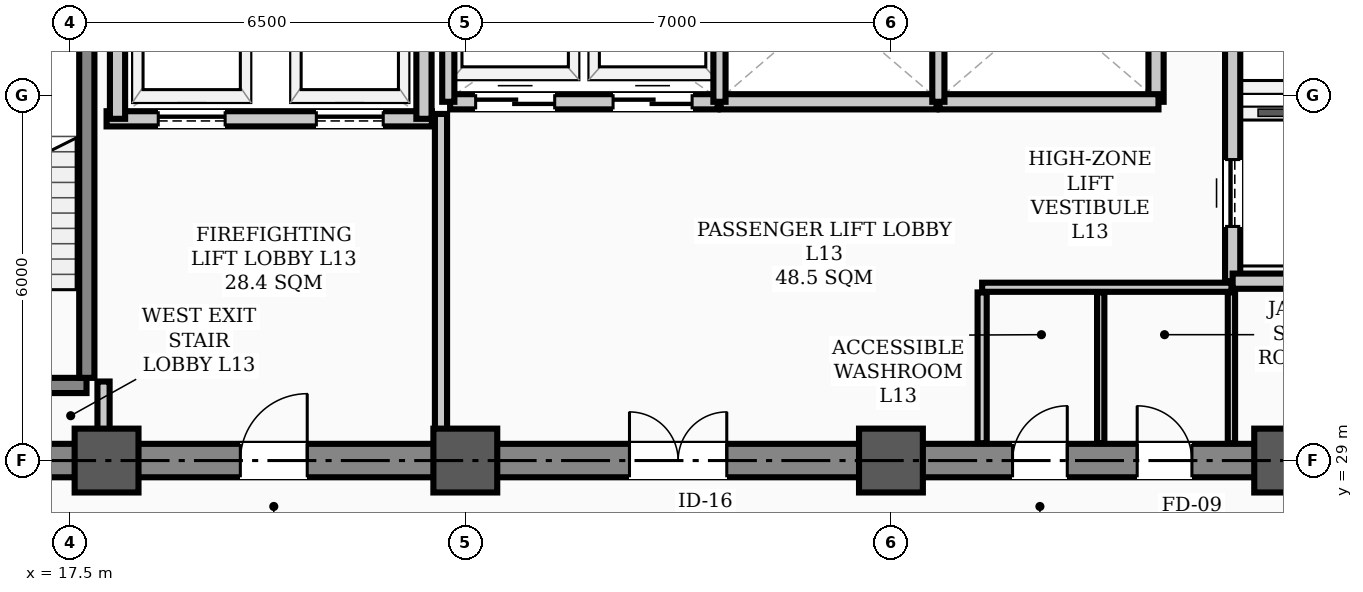
"""IFC4 building model, lengths in metres.
Left out: names, types, materials, properties, quantities, classifications, styles, units other than length and angle.
Written with IfcOpenShell. Run it as: python <this file> out.ifc"""

import sys

from ifc_helpers import new_model, si_unit, direction, frame, frame_2d, origin, origin_2d, place, context, subcontext, project, spatial, rectangle, hollow_rectangle, extrude, element, fill, save


model = new_model("IFC4")
c1 = context("Model", 3, precision=1e-05, world=origin(), true_north=direction((0.0, 1.0)))
c2 = subcontext(c1, "Body", "Model", "MODEL_VIEW")
j1 = project(units=[si_unit("LENGTHUNIT", "METRE"), si_unit("PLANEANGLEUNIT", "RADIAN")], contexts=[c1])
p1 = place(None, origin())
s1 = spatial("IfcSite", under=j1, at=p1, CompositionType="ELEMENT")
p2 = place(p1, origin())
s2 = spatial("IfcBuilding", under=s1, at=p2, CompositionType="ELEMENT")
p3 = place(p2, frame((0.0, 0.0, 53.8)))
s3 = spatial("IfcBuildingStorey", under=s2, at=p3, CompositionType="ELEMENT", Elevation=53.8)
for number, where, z_axis, x_axis in (
    (1, (18.1, 29.0, 0.0), (0.0, 0.0, 1.0), (1.0, 0.0, 0.0)),
    (2, (24.0, 29.0, 0.0), (0.0, 0.0, 1.0), (1.0, 0.0, 0.0)),
    (3, (31.0, 29.0, 0.0), (0.0, 0.0, 1.0), (1.0, 0.0, 0.0)),
    (4, (37.5, 29.0, 0.0), (0.0, 0.0, 1.0), (1.0, 0.0, 0.0)),
):
    element("IfcColumn", number, at=place(p3, frame(where, z_axis=z_axis, x_axis=x_axis)), inside=s3, PredefinedType="COLUMN", context=c2, shape_type="SweptSolid", body=[
        extrude(hollow_rectangle(XDim=1.05, YDim=1.05, WallThickness=0.038, InnerFilletRadius=0.019, OuterFilletRadius=0.057, at=origin_2d()), origin(), (0.0, 0.0, 1.0), 3.9),
    ])
p4 = place(p3, frame((13.5, 29.0, 0.0), z_axis=(0.0, 0.0, 1.0), x_axis=(1.0, 0.0, 0.0)))
e5 = element("IfcWall", 5, at=p4, inside=s3, PredefinedType="SHEAR", context=c2, shape_type="SweptSolid", body=[
    extrude(rectangle(XDim=30.5, YDim=0.55, at=frame_2d((15.25, 0.0))), origin(), (0.0, 0.0, 1.0), 3.72),
])
p5 = place(p4, frame((1.75, 0.0, 0.0)))
e6 = element("IfcOpeningElement", 6, at=p5, cuts=e5, PredefinedType="OPENING", context=c2, shape_type="SweptSolid", body=[
    extrude(rectangle(XDim=1.1, YDim=2.08, at=frame_2d((0.55, 1.04))), frame((0.0, 0.285, 0.0), z_axis=(0.0, -1.0, 0.0), x_axis=(1.0, 0.0, 0.0)), (0.0, 0.0, 1.0), 0.57),
])
p6 = place(p4, frame((26.7, 0.0, 0.0)))
e7 = element("IfcOpeningElement", 7, at=p6, cuts=e5, PredefinedType="OPENING", context=c2, shape_type="SweptSolid", body=[
    extrude(rectangle(XDim=1.1, YDim=2.08, at=frame_2d((0.55, 1.04))), frame((0.0, 0.285, 0.0), z_axis=(0.0, -1.0, 0.0), x_axis=(1.0, 0.0, 0.0)), (0.0, 0.0, 1.0), 0.57),
])
p7 = place(p4, frame((6.8, 0.0, 0.0)))
e8 = element("IfcOpeningElement", 8, at=p7, cuts=e5, PredefinedType="OPENING", context=c2, shape_type="SweptSolid", body=[
    extrude(rectangle(XDim=1.1, YDim=2.08, at=frame_2d((0.55, 1.04))), frame((0.0, 0.285, 0.0), z_axis=(0.0, -1.0, 0.0), x_axis=(1.0, 0.0, 0.0)), (0.0, 0.0, 1.0), 0.57),
])
p8 = place(p4, frame((13.2, 0.0, 0.0)))
e9 = element("IfcOpeningElement", 9, at=p8, cuts=e5, PredefinedType="OPENING", context=c2, shape_type="SweptSolid", body=[
    extrude(rectangle(XDim=1.6, YDim=2.08, at=frame_2d((0.8, 1.04))), frame((0.0, 0.285, 0.0), z_axis=(0.0, -1.0, 0.0), x_axis=(1.0, 0.0, 0.0)), (0.0, 0.0, 1.0), 0.57),
])
p9 = place(p4, frame((19.5, 0.0, 0.0)))
e10 = element("IfcOpeningElement", 10, at=p9, cuts=e5, PredefinedType="OPENING", context=c2, shape_type="SweptSolid", body=[
    extrude(rectangle(XDim=0.9, YDim=2.08, at=frame_2d((0.45, 1.04))), frame((0.0, 0.285, 0.0), z_axis=(0.0, -1.0, 0.0), x_axis=(1.0, 0.0, 0.0)), (0.0, 0.0, 1.0), 0.57),
])
p10 = place(p4, frame((21.55, 0.0, 0.0)))
e11 = element("IfcOpeningElement", 11, at=p10, cuts=e5, PredefinedType="OPENING", context=c2, shape_type="SweptSolid", body=[
    extrude(rectangle(XDim=0.9, YDim=2.08, at=frame_2d((0.45, 1.04))), frame((0.0, 0.285, 0.0), z_axis=(0.0, -1.0, 0.0), x_axis=(1.0, 0.0, 0.0)), (0.0, 0.0, 1.0), 0.57),
])
p11 = place(p3, frame((14.43, 30.235, 0.0), z_axis=(0.0, 0.0, 1.0), x_axis=(1.0, 0.0, 0.0)))
e12 = element("IfcWall", 12, at=p11, inside=s3, PredefinedType="STANDARD", context=c2, shape_type="SweptSolid", body=[
    extrude(rectangle(XDim=3.34, YDim=0.25, at=frame_2d((1.67, 0.0))), origin(), (0.0, 0.0, 1.0), 3.72),
])
p12 = place(p11, frame((1.1, 0.0, 0.0)))
e13 = element("IfcOpeningElement", 13, at=p12, cuts=e12, PredefinedType="OPENING", context=c2, shape_type="SweptSolid", body=[
    extrude(rectangle(XDim=1.1, YDim=2.08, at=frame_2d((0.55, 1.04))), frame((0.0, 0.135, 0.0), z_axis=(0.0, -1.0, 0.0), x_axis=(1.0, 0.0, 0.0)), (0.0, 0.0, 1.0), 0.27),
])
p13 = place(p3, frame((17.775, 30.36, 0.0), z_axis=(0.0, 0.0, 1.0), x_axis=(0.0, 1.0, 0.0)))
e14 = element("IfcWall", 14, at=p13, inside=s3, PredefinedType="STANDARD", context=c2, shape_type="SweptSolid", body=[
    extrude(rectangle(XDim=7.184, YDim=0.25, at=frame_2d((3.592, 0.0))), origin(), (0.0, 0.0, 1.0), 3.72),
])
p14 = place(p3, frame((18.1, 34.62, 0.0), z_axis=(0.0, 0.0, 1.0), x_axis=(1.0, 0.0, 0.0)))
e15 = element("IfcWall", 15, at=p14, inside=s3, PredefinedType="STANDARD", context=c2, shape_type="SweptSolid", body=[
    extrude(rectangle(XDim=5.35, YDim=0.25, at=frame_2d((2.675, 0.0))), origin(), (0.0, 0.0, 1.0), 3.72),
])
p15 = place(p14, frame((0.85, 0.0, 0.0)))
e16 = element("IfcOpeningElement", 16, at=p15, cuts=e15, PredefinedType="OPENING", context=c2, shape_type="SweptSolid", body=[
    extrude(rectangle(XDim=1.1, YDim=2.08, at=frame_2d((0.55, 1.04))), frame((0.0, 0.135, 0.0), z_axis=(0.0, -1.0, 0.0), x_axis=(1.0, 0.0, 0.0)), (0.0, 0.0, 1.0), 0.27),
])
p16 = place(p14, frame((3.45, 0.0, 0.0)))
e17 = element("IfcOpeningElement", 17, at=p16, cuts=e15, PredefinedType="OPENING", context=c2, shape_type="SweptSolid", body=[
    extrude(rectangle(XDim=1.1, YDim=2.08, at=frame_2d((0.55, 1.04))), frame((0.0, 0.135, 0.0), z_axis=(0.0, -1.0, 0.0), x_axis=(1.0, 0.0, 0.0)), (0.0, 0.0, 1.0), 0.27),
])
p17 = place(p3, frame((36.62, 31.95, 0.0), z_axis=(0.0, 0.0, 1.0), x_axis=(0.0, 1.0, 0.0)))
e18 = element("IfcWall", 18, at=p17, inside=s3, PredefinedType="STANDARD", context=c2, shape_type="SweptSolid", body=[
    extrude(rectangle(XDim=6.0, YDim=0.25, at=frame_2d((3.0, 0.0))), origin(), (0.0, 0.0, 1.0), 3.3),
])
p18 = place(p17, frame((0.9, 0.0, 0.0)))
e19 = element("IfcOpeningElement", 19, at=p18, cuts=e18, PredefinedType="OPENING", context=c2, shape_type="SweptSolid", body=[
    extrude(rectangle(XDim=1.1, YDim=2.08, at=frame_2d((0.55, 1.04))), frame((0.0, 0.135, 0.0), z_axis=(0.0, -1.0, 0.0), x_axis=(1.0, 0.0, 0.0)), (0.0, 0.0, 1.0), 0.27),
])
p19 = place(p17, frame((4.0, 0.0, 0.0)))
e20 = element("IfcOpeningElement", 20, at=p19, cuts=e18, PredefinedType="OPENING", context=c2, shape_type="SweptSolid", body=[
    extrude(rectangle(XDim=1.1, YDim=2.08, at=frame_2d((0.55, 1.04))), frame((0.0, 0.135, 0.0), z_axis=(0.0, -1.0, 0.0), x_axis=(1.0, 0.0, 0.0)), (0.0, 0.0, 1.0), 0.27),
])
p20 = place(p3, frame((36.62, 31.95, 0.0), z_axis=(0.0, 0.0, 1.0), x_axis=(1.0, 0.0, 0.0)))
e21 = element("IfcWall", 21, at=p20, inside=s3, PredefinedType="STANDARD", context=c2, shape_type="SweptSolid", body=[
    extrude(rectangle(XDim=1.9, YDim=0.25, at=frame_2d((0.95, 0.0))), origin(), (0.0, 0.0, 1.0), 3.48),
])
for number, where, z_axis, x_axis in (
    (22, (18.28, 34.62, 0.0), (0.0, 0.0, 1.0), (0.0, 1.0, 0.0)),
    (23, (23.32, 34.62, 0.0), (0.0, 0.0, 1.0), (0.0, 1.0, 0.0)),
):
    element("IfcWall", number, at=place(p3, frame(where, z_axis=z_axis, x_axis=x_axis)), inside=s3, PredefinedType="STANDARD", context=c2, shape_type="SweptSolid", body=[
        extrude(rectangle(XDim=3.33, YDim=0.25, at=frame_2d((1.665, 0.0))), origin(), (0.0, 0.0, 1.0), 3.3),
    ])
p21 = place(p3, frame((35.36, 34.9, 0.0), z_axis=(0.0, 0.0, 1.0), x_axis=(0.0, 1.0, 0.0)))
e24 = element("IfcWall", 24, at=p21, inside=s3, PredefinedType="STANDARD", context=c2, shape_type="SweptSolid", body=[
    extrude(rectangle(XDim=3.05, YDim=0.25, at=frame_2d((1.525, 0.0))), origin(), (0.0, 0.0, 1.0), 3.3),
])
p22 = place(p3, frame((23.75, 34.9, 0.0), z_axis=(0.0, 0.0, 1.0), x_axis=(1.0, 0.0, 0.0)))
e25 = element("IfcWall", 25, at=p22, inside=s3, PredefinedType="STANDARD", context=c2, shape_type="SweptSolid", body=[
    extrude(rectangle(XDim=4.4, YDim=0.25, at=frame_2d((2.2, 0.0))), origin(), (0.0, 0.0, 1.0), 3.72),
])
p23 = place(p22, frame((0.42, 0.0, 0.0)))
e26 = element("IfcOpeningElement", 26, at=p23, cuts=e25, PredefinedType="OPENING", context=c2, shape_type="SweptSolid", body=[
    extrude(rectangle(XDim=1.3, YDim=2.08, at=frame_2d((0.65, 1.04))), frame((0.0, 0.135, 0.0), z_axis=(0.0, -1.0, 0.0), x_axis=(1.0, 0.0, 0.0)), (0.0, 0.0, 1.0), 0.27),
])
p24 = place(p22, frame((2.68, 0.0, 0.0)))
e27 = element("IfcOpeningElement", 27, at=p24, cuts=e25, PredefinedType="OPENING", context=c2, shape_type="SweptSolid", body=[
    extrude(rectangle(XDim=1.3, YDim=2.08, at=frame_2d((0.65, 1.04))), frame((0.0, 0.135, 0.0), z_axis=(0.0, -1.0, 0.0), x_axis=(1.0, 0.0, 0.0)), (0.0, 0.0, 1.0), 0.27),
])
p25 = place(p3, frame((28.2, 34.9, 0.0), z_axis=(0.0, 0.0, 1.0), x_axis=(1.0, 0.0, 0.0)))
e28 = element("IfcWall", 28, at=p25, inside=s3, PredefinedType="STANDARD", context=c2, shape_type="SweptSolid", body=[
    extrude(rectangle(XDim=3.55, YDim=0.25, at=frame_2d((1.775, 0.0))), origin(), (0.0, 0.0, 1.0), 3.72),
])
p26 = place(p3, frame((31.8, 34.9, 0.0), z_axis=(0.0, 0.0, 1.0), x_axis=(1.0, 0.0, 0.0)))
e29 = element("IfcWall", 29, at=p26, inside=s3, PredefinedType="STANDARD", context=c2, shape_type="SweptSolid", body=[
    extrude(rectangle(XDim=3.6, YDim=0.25, at=frame_2d((1.8, 0.0))), origin(), (0.0, 0.0, 1.0), 3.72),
])
p27 = place(p3, frame((32.5, 31.85, 0.0), z_axis=(0.0, 0.0, 1.0), x_axis=(1.0, 0.0, 0.0)))
e30 = element("IfcWall", 30, at=p27, inside=s3, PredefinedType="PARTITIONING", context=c2, shape_type="SweptSolid", body=[
    extrude(rectangle(XDim=4.1, YDim=0.15, at=frame_2d((2.05, 0.0))), origin(), (0.0, 0.0, 1.0), 3.72),
])
p28 = place(p3, frame((18.05, 29.285, 0.0), z_axis=(0.0, 0.0, 1.0), x_axis=(0.0, 1.0, 0.0)))
e31 = element("IfcWall", 31, at=p28, inside=s3, PredefinedType="STANDARD", context=c2, shape_type="SweptSolid", body=[
    extrude(rectangle(XDim=1.015, YDim=0.2, at=frame_2d((0.508, 0.0))), origin(), (0.0, 0.0, 1.0), 3.3),
])
p29 = place(p3, frame((23.6, 29.285, 0.0), z_axis=(0.0, 0.0, 1.0), x_axis=(0.0, 1.0, 0.0)))
e32 = element("IfcWall", 32, at=p29, inside=s3, PredefinedType="STANDARD", context=c2, shape_type="SweptSolid", body=[
    extrude(rectangle(XDim=5.415, YDim=0.2, at=frame_2d((2.708, 0.0))), origin(), (0.0, 0.0, 1.0), 3.1),
])
p30 = place(p3, frame((32.5, 29.285, 0.0), z_axis=(0.0, 0.0, 1.0), x_axis=(0.0, 1.0, 0.0)))
e33 = element("IfcWall", 33, at=p30, inside=s3, PredefinedType="PARTITIONING", context=c2, shape_type="SweptSolid", body=[
    extrude(rectangle(XDim=2.48, YDim=0.15, at=frame_2d((1.24, 0.0))), origin(), (0.0, 0.0, 1.0), 3.3),
])
for number, where, z_axis, x_axis in (
    (34, (36.6, 29.285, 0.0), (0.0, 0.0, 1.0), (0.0, 1.0, 0.0)),
    (35, (34.45, 29.285, 0.0), (0.0, 0.0, 1.0), (0.0, 1.0, 0.0)),
):
    element("IfcWall", number, at=place(p3, frame(where, z_axis=z_axis, x_axis=x_axis)), inside=s3, PredefinedType="PARTITIONING", context=c2, shape_type="SweptSolid", body=[
        extrude(rectangle(XDim=2.48, YDim=0.12, at=frame_2d((1.24, 0.0))), origin(), (0.0, 0.0, 1.0), 3.3),
    ])
p31 = place(p3, frame((23.72, 34.9, 0.0), z_axis=(0.0, 0.0, 1.0), x_axis=(0.0, 1.0, 0.0)))
e36 = element("IfcWall", 36, at=p31, inside=s3, PredefinedType="STANDARD", context=c2, shape_type="SweptSolid", body=[
    extrude(rectangle(XDim=3.12, YDim=0.2, at=frame_2d((1.56, 0.0))), origin(), (0.0, 0.0, 1.0), 3.1),
])
for number, where, z_axis, x_axis in (
    (37, (28.18, 34.9, 0.0), (0.0, 0.0, 1.0), (0.0, 1.0, 0.0)),
    (38, (31.78, 34.9, 0.0), (0.0, 0.0, 1.0), (0.0, 1.0, 0.0)),
):
    element("IfcWall", number, at=place(p3, frame(where, z_axis=z_axis, x_axis=x_axis)), inside=s3, PredefinedType="STANDARD", context=c2, shape_type="SweptSolid", body=[
        extrude(rectangle(XDim=3.12, YDim=0.2, at=frame_2d((1.56, 0.0))), origin(), (0.0, 0.0, 1.0), 3.3),
    ])
p32 = place(p7, origin())
e39 = element("IfcDoor", 39, at=p32, inside=s3, OperationType="SINGLE_SWING_RIGHT", PredefinedType="DOOR", context=c2, shape_type="SweptSolid", body=[
    extrude(rectangle(XDim=1.1, YDim=2.08, at=frame_2d((0.55, 1.04))), frame((0.0, 0.025, 0.0), z_axis=(0.0, -1.0, 0.0), x_axis=(1.0, 0.0, 0.0)), (0.0, 0.0, 1.0), 0.05),
])
fill(e8, e39)
p33 = place(p8, origin())
e40 = element("IfcDoor", 40, at=p33, inside=s3, OperationType="DOUBLE_DOOR_SINGLE_SWING", PredefinedType="DOOR", context=c2, shape_type="SweptSolid", body=[
    extrude(rectangle(XDim=1.6, YDim=2.08, at=frame_2d((0.8, 1.04))), frame((0.0, 0.025, 0.0), z_axis=(0.0, -1.0, 0.0), x_axis=(1.0, 0.0, 0.0)), (0.0, 0.0, 1.0), 0.05),
])
fill(e9, e40)
p34 = place(p9, origin())
e41 = element("IfcDoor", 41, at=p34, inside=s3, OperationType="SINGLE_SWING_RIGHT", PredefinedType="DOOR", context=c2, shape_type="SweptSolid", body=[
    extrude(rectangle(XDim=0.9, YDim=2.08, at=frame_2d((0.45, 1.04))), frame((0.0, 0.025, 0.0), z_axis=(0.0, -1.0, 0.0), x_axis=(1.0, 0.0, 0.0)), (0.0, 0.0, 1.0), 0.05),
])
fill(e10, e41)
p35 = place(p10, origin())
e42 = element("IfcDoor", 42, at=p35, inside=s3, OperationType="SINGLE_SWING_LEFT", PredefinedType="DOOR", context=c2, shape_type="SweptSolid", body=[
    extrude(rectangle(XDim=0.9, YDim=2.08, at=frame_2d((0.45, 1.04))), frame((0.0, 0.025, 0.0), z_axis=(0.0, -1.0, 0.0), x_axis=(1.0, 0.0, 0.0)), (0.0, 0.0, 1.0), 0.05),
])
fill(e11, e42)
p36 = place(p15, origin())
e43 = element("IfcDoor", 43, at=p36, inside=s3, OperationType="SLIDING_TO_LEFT", PredefinedType="DOOR", context=c2, shape_type="SweptSolid", body=[
    extrude(rectangle(XDim=1.1, YDim=2.08, at=frame_2d((0.55, 1.04))), frame((0.0, 0.025, 0.0), z_axis=(0.0, -1.0, 0.0), x_axis=(1.0, 0.0, 0.0)), (0.0, 0.0, 1.0), 0.05),
])
fill(e16, e43)
p37 = place(p16, origin())
e44 = element("IfcDoor", 44, at=p37, inside=s3, OperationType="SLIDING_TO_LEFT", PredefinedType="DOOR", context=c2, shape_type="SweptSolid", body=[
    extrude(rectangle(XDim=1.1, YDim=2.08, at=frame_2d((0.55, 1.04))), frame((0.0, 0.025, 0.0), z_axis=(0.0, -1.0, 0.0), x_axis=(1.0, 0.0, 0.0)), (0.0, 0.0, 1.0), 0.05),
])
fill(e17, e44)
p38 = place(p18, origin())
e45 = element("IfcDoor", 45, at=p38, inside=s3, OperationType="SLIDING_TO_LEFT", PredefinedType="DOOR", context=c2, shape_type="SweptSolid", body=[
    extrude(rectangle(XDim=1.1, YDim=2.08, at=frame_2d((0.55, 1.04))), frame((0.0, 0.025, 0.0), z_axis=(0.0, -1.0, 0.0), x_axis=(1.0, 0.0, 0.0)), (0.0, 0.0, 1.0), 0.05),
])
fill(e19, e45)
p39 = place(p23, origin())
e46 = element("IfcDoor", 46, at=p39, inside=s3, OperationType="DOUBLE_DOOR_SLIDING", PredefinedType="DOOR", context=c2, shape_type="SweptSolid", body=[
    extrude(rectangle(XDim=1.3, YDim=2.08, at=frame_2d((0.65, 1.04))), frame((0.0, 0.025, 0.0), z_axis=(0.0, -1.0, 0.0), x_axis=(1.0, 0.0, 0.0)), (0.0, 0.0, 1.0), 0.05),
])
fill(e26, e46)
p40 = place(p24, origin())
e47 = element("IfcDoor", 47, at=p40, inside=s3, OperationType="DOUBLE_DOOR_SLIDING", PredefinedType="DOOR", context=c2, shape_type="SweptSolid", body=[
    extrude(rectangle(XDim=1.3, YDim=2.08, at=frame_2d((0.65, 1.04))), frame((0.0, 0.025, 0.0), z_axis=(0.0, -1.0, 0.0), x_axis=(1.0, 0.0, 0.0)), (0.0, 0.0, 1.0), 0.05),
])
fill(e27, e47)
save(model, sys.argv[1])
